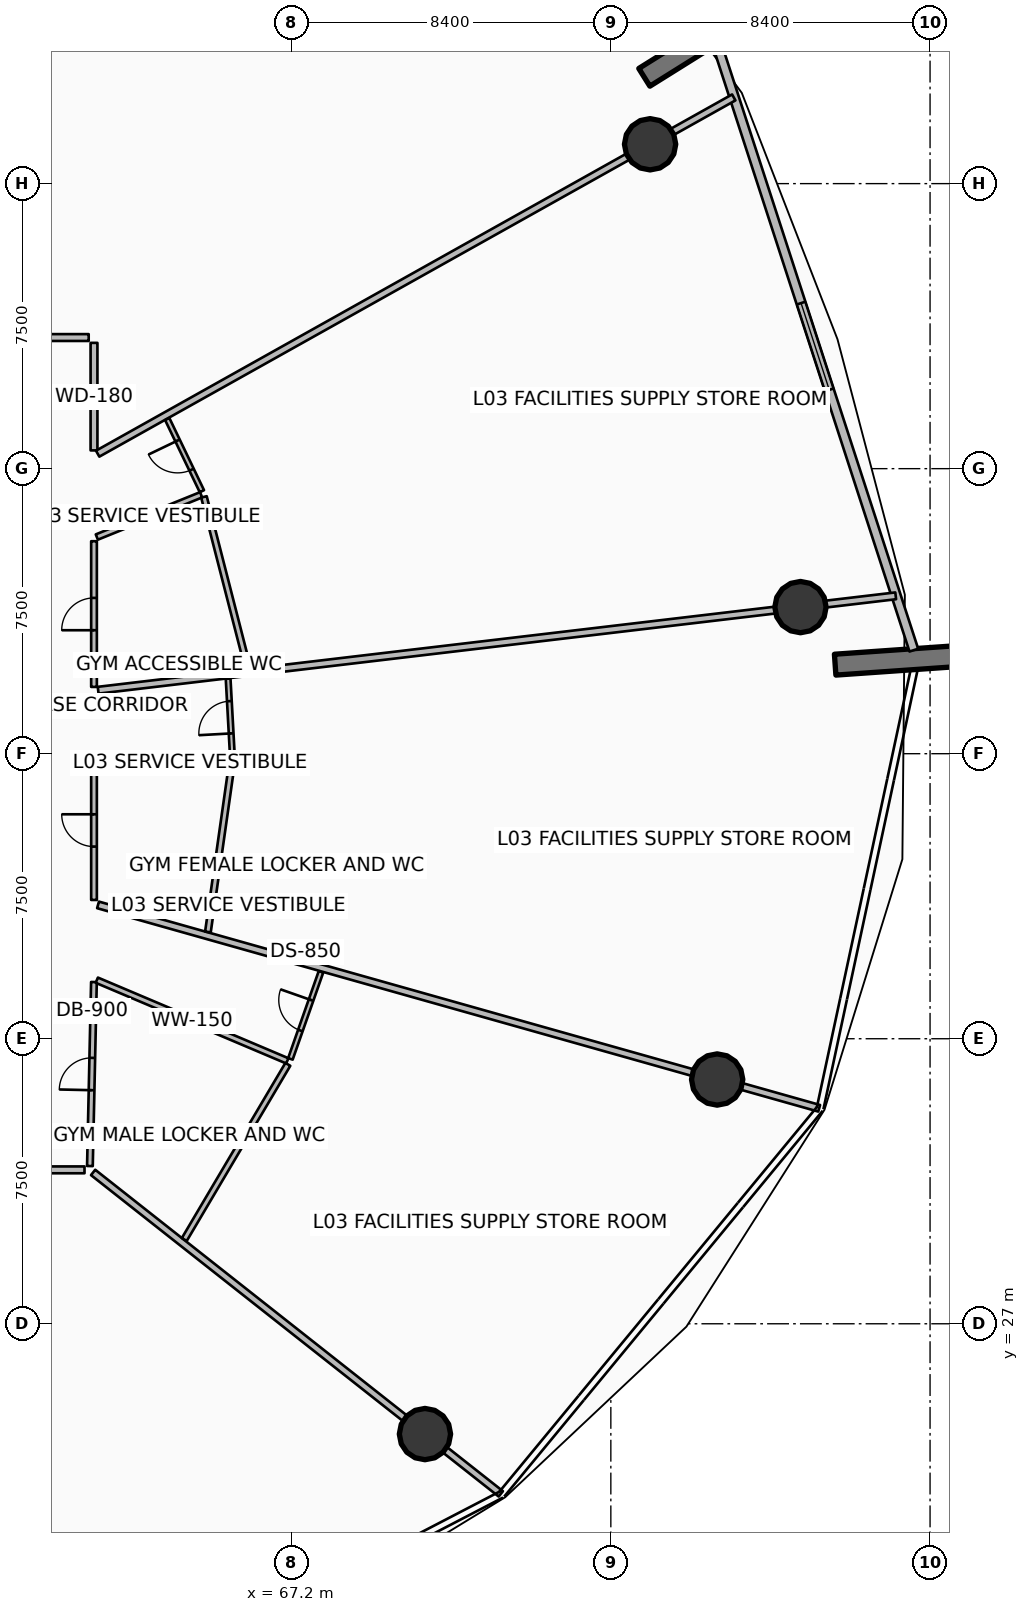
"""IFC4 building model, lengths in metres.
Left out: names, types, materials, properties, quantities, classifications, styles, units other than length and angle.
Written with IfcOpenShell. Run it as: python <this file> out.ifc"""

import sys

from ifc_helpers import new_model, si_unit, direction, frame, frame_2d, origin, origin_2d, place, context, subcontext, project, spatial, rectangle, circle, extrude, element, fill, save


model = new_model("IFC4")
c1 = context("Model", 3, precision=1e-05, world=origin(), true_north=direction((0.0, 1.0)))
c2 = subcontext(c1, "Body", "Model", "MODEL_VIEW")
j1 = project(units=[si_unit("LENGTHUNIT", "METRE"), si_unit("PLANEANGLEUNIT", "RADIAN")], contexts=[c1])
p1 = place(None, origin())
s1 = spatial("IfcSite", under=j1, at=p1, CompositionType="ELEMENT")
p2 = place(p1, origin())
s2 = spatial("IfcBuilding", under=s1, at=p2, CompositionType="ELEMENT")
p3 = place(p2, frame((0.0, 0.0, 16.8)))
s3 = spatial("IfcBuildingStorey", under=s2, at=p3, CompositionType="ELEMENT", Elevation=16.8)
for number, where, z_axis, x_axis in (
    (1, (76.481, 59.797, 0.0), (0.0, 0.0, 1.0), (0.848, 0.53, 0.0)),
    (2, (81.503, 44.343, 0.0), (0.0, 0.0, 1.0), (0.998, 0.07, 0.0)),
):
    element("IfcWall", number, at=place(p3, frame(where, z_axis=z_axis, x_axis=x_axis)), inside=s3, PredefinedType="SOLIDWALL", context=c2, shape_type="SweptSolid", body=[
        extrude(rectangle(XDim=3.5, YDim=0.55, at=frame_2d((1.75, 0.0))), origin(), (0.0, 0.0, 1.0), 4.8),
    ])
for number, where, z_axis, x_axis in (
    (3, (76.633, 58.035, 0.0), (0.0, 0.0, 1.0), (1.0, 0.0, 0.0)),
    (4, (70.709, 24.098, 0.0), (0.0, 0.0, 1.0), (1.0, 0.0, 0.0)),
    (5, (78.398, 33.427, 0.0), (0.0, 0.0, 1.0), (1.0, 0.0, 0.0)),
    (6, (80.59, 45.857, 0.0), (0.0, 0.0, 1.0), (1.0, 0.0, 0.0)),
):
    element("IfcColumn", number, at=place(p3, frame(where, z_axis=z_axis, x_axis=x_axis)), inside=s3, PredefinedType="COLUMN", context=c2, shape_type="SweptSolid", body=[
        extrude(circle(Radius=0.675, at=origin_2d()), origin(), (0.0, 0.0, 1.0), 4.4),
    ])
p4 = place(p3, frame((83.573, 44.725, 0.0), z_axis=(0.0, 0.0, 1.0), x_axis=(-0.309022005354, 0.951054888115, 0.0)))
e7 = element("IfcWall", 7, at=p4, inside=s3, PredefinedType="SOLIDWALL", context=c2, shape_type="SweptSolid", body=[
    extrude(rectangle(XDim=16.803, YDim=0.24, at=frame_2d((8.401, 0.0))), origin(), (0.0, 0.0, 1.0), 3.35),
])
p5 = place(p4, frame((7.201, 0.0, 0.85)))
e8 = element("IfcOpeningElement", 8, at=p5, cuts=e7, PredefinedType="OPENING", context=c2, shape_type="SweptSolid", body=[
    extrude(rectangle(XDim=2.4, YDim=2.1, at=frame_2d((1.2, 1.05))), frame((0.0, 0.13, 0.0), z_axis=(0.0, -1.0, 0.0), x_axis=(1.0, 0.0, 0.0)), (0.0, 0.0, 1.0), 0.26),
])
p6 = place(p3, frame((62.0, 49.98, 0.0), z_axis=(0.0, 0.0, 1.0), x_axis=(0.0, 1.0, 0.0)))
e9 = element("IfcWall", 9, at=p6, inside=s3, PredefinedType="PARTITIONING", context=c2, shape_type="SweptSolid", body=[
    extrude(rectangle(XDim=2.83, YDim=0.18, at=frame_2d((1.415, 0.0))), origin(), (0.0, 0.0, 1.0), 3.613),
])
p7 = place(p3, frame((61.86, 52.95, 0.0), z_axis=(0.0, 0.0, 1.0), x_axis=(-1.0, 0.0, 0.0)))
e10 = element("IfcWall", 10, at=p7, inside=s3, PredefinedType="PARTITIONING", context=c2, shape_type="SweptSolid", body=[
    extrude(rectangle(XDim=5.088, YDim=0.18, at=frame_2d((2.544, 0.0))), origin(), (0.0, 0.0, 1.0), 3.613),
])
p8 = place(p3, frame((62.096, 49.894, 0.0), z_axis=(0.0, 0.0, 1.0), x_axis=(0.872490608205, 0.488630881744, 0.0)))
e11 = element("IfcWall", 11, at=p8, inside=s3, PredefinedType="PARTITIONING", context=c2, shape_type="SweptSolid", body=[
    extrude(rectangle(XDim=19.185, YDim=0.18, at=frame_2d((9.592, 0.0))), origin(), (0.0, 0.0, 1.0), 3.613),
])
p9 = place(p3, frame((54.272, 31.05, 0.0), z_axis=(0.0, 0.0, 1.0), x_axis=(1.0, 0.0, 0.0)))
e12 = element("IfcWall", 12, at=p9, inside=s3, PredefinedType="PARTITIONING", context=c2, shape_type="SweptSolid", body=[
    extrude(rectangle(XDim=7.478, YDim=0.18, at=frame_2d((3.739, 0.0))), origin(), (0.0, 0.0, 1.0), 3.613),
])
p10 = place(p9, frame((3.214, 0.0, 0.0)))
e13 = element("IfcOpeningElement", 13, at=p10, cuts=e12, PredefinedType="OPENING", context=c2, shape_type="SweptSolid", body=[
    extrude(rectangle(XDim=1.05, YDim=2.1, at=frame_2d((0.525, 1.05))), frame((0.0, 0.1, 0.0), z_axis=(0.0, -1.0, 0.0), x_axis=(1.0, 0.0, 0.0)), (0.0, 0.0, 1.0), 0.2),
])
p11 = place(p3, frame((61.976, 30.982, 0.0), z_axis=(0.0, 0.0, 1.0), x_axis=(0.785315783489, -0.619095404766, 0.0)))
e14 = element("IfcWall", 14, at=p11, inside=s3, PredefinedType="PARTITIONING", context=c2, shape_type="SweptSolid", body=[
    extrude(rectangle(XDim=13.661, YDim=0.18, at=frame_2d((6.831, 0.0))), origin(), (0.0, 0.0, 1.0), 3.613),
])
p12 = place(p3, frame((61.892, 31.15, 0.0), z_axis=(0.0, 0.0, 1.0), x_axis=(0.021928973177, 0.999759531155, 0.0)))
e15 = element("IfcWall", 15, at=p12, inside=s3, PredefinedType="PARTITIONING", context=c2, shape_type="SweptSolid", body=[
    extrude(rectangle(XDim=4.843, YDim=0.15, at=frame_2d((2.421, 0.0))), origin(), (0.0, 0.0, 1.0), 3.613),
])
p13 = place(p12, frame((1.997, 0.0, 0.0)))
e16 = element("IfcOpeningElement", 16, at=p13, cuts=e15, PredefinedType="OPENING", context=c2, shape_type="SweptSolid", body=[
    extrude(rectangle(XDim=0.85, YDim=2.06, at=frame_2d((0.425, 1.03))), frame((0.0, 0.085, 0.0), z_axis=(0.0, -1.0, 0.0), x_axis=(1.0, 0.0, 0.0)), (0.0, 0.0, 1.0), 0.17),
])
p14 = place(p3, frame((62.074, 36.041, 0.0), z_axis=(0.0, 0.0, 1.0), x_axis=(0.920841540816, -0.38993699069, 0.0)))
e17 = element("IfcWall", 17, at=p14, inside=s3, PredefinedType="PARTITIONING", context=c2, shape_type="SweptSolid", body=[
    extrude(rectangle(XDim=5.443, YDim=0.15, at=frame_2d((2.722, 0.0))), origin(), (0.0, 0.0, 1.0), 3.84),
])
p15 = place(p3, frame((64.375, 29.217, 0.0), z_axis=(0.0, 0.0, 1.0), x_axis=(0.509047270842, 0.860738564286, 0.0)))
e18 = element("IfcWall", 18, at=p15, inside=s3, PredefinedType="PARTITIONING", context=c2, shape_type="SweptSolid", body=[
    extrude(rectangle(XDim=5.354, YDim=0.15, at=frame_2d((2.677, 0.0))), origin(), (0.0, 0.0, 1.0), 3.613),
])
p16 = place(p3, frame((67.168, 33.97, 0.0), z_axis=(0.0, 0.0, 1.0), x_axis=(0.331316814656, 0.943519564358, 0.0)))
e19 = element("IfcWall", 19, at=p16, inside=s3, PredefinedType="PARTITIONING", context=c2, shape_type="SweptSolid", body=[
    extrude(rectangle(XDim=2.43, YDim=0.125, at=frame_2d((1.215, 0.0))), origin(), (0.0, 0.0, 1.0), 3.613),
])
p17 = place(p16, frame((0.79, 0.0, 0.0)))
e20 = element("IfcOpeningElement", 20, at=p17, cuts=e19, PredefinedType="OPENING", context=c2, shape_type="SweptSolid", body=[
    extrude(rectangle(XDim=0.85, YDim=2.06, at=frame_2d((0.425, 1.03))), frame((0.0, 0.073, 0.0), z_axis=(0.0, -1.0, 0.0), x_axis=(1.0, 0.0, 0.0)), (0.0, 0.0, 1.0), 0.145),
])
p18 = place(p3, frame((62.106, 38.022, 0.0), z_axis=(0.0, 0.0, 1.0), x_axis=(0.962455233657, -0.271440459782, 0.0)))
e21 = element("IfcWall", 21, at=p18, inside=s3, PredefinedType="PARTITIONING", context=c2, shape_type="SweptSolid", body=[
    extrude(rectangle(XDim=19.716, YDim=0.18, at=frame_2d((9.858, 0.0))), origin(), (0.0, 0.0, 1.0), 3.613),
])
p19 = place(p3, frame((62.0, 38.152, 0.0), z_axis=(0.0, 0.0, 1.0), x_axis=(0.0, 1.0, 0.0)))
e22 = element("IfcWall", 22, at=p19, inside=s3, PredefinedType="PARTITIONING", context=c2, shape_type="SweptSolid", body=[
    extrude(rectangle(XDim=3.658, YDim=0.15, at=frame_2d((1.829, 0.0))), origin(), (0.0, 0.0, 1.0), 3.613),
])
p20 = place(p19, frame((1.404, 0.0, 0.0)))
e23 = element("IfcOpeningElement", 23, at=p20, cuts=e22, PredefinedType="OPENING", context=c2, shape_type="SweptSolid", body=[
    extrude(rectangle(XDim=0.85, YDim=2.06, at=frame_2d((0.425, 1.03))), frame((0.0, 0.085, 0.0), z_axis=(0.0, -1.0, 0.0), x_axis=(1.0, 0.0, 0.0)), (0.0, 0.0, 1.0), 0.17),
])
p21 = place(p3, frame((62.08, 41.889, 0.0), z_axis=(0.0, 0.0, 1.0), x_axis=(0.999969031596, -0.007869933178, 0.0)))
e24 = element("IfcWall", 24, at=p21, inside=s3, PredefinedType="PARTITIONING", context=c2, shape_type="SweptSolid", body=[
    extrude(rectangle(XDim=3.505, YDim=0.15, at=frame_2d((1.753, 0.0))), origin(), (0.0, 0.0, 1.0), 3.84),
])
p22 = place(p3, frame((64.998, 37.309, 0.0), z_axis=(0.0, 0.0, 1.0), x_axis=(0.140922059176, 0.990020693338, 0.0)))
e25 = element("IfcWall", 25, at=p22, inside=s3, PredefinedType="PARTITIONING", context=c2, shape_type="SweptSolid", body=[
    extrude(rectangle(XDim=4.518, YDim=0.15, at=frame_2d((2.259, 0.0))), origin(), (0.0, 0.0, 1.0), 3.613),
])
p23 = place(p3, frame((65.641, 41.941, 0.0), z_axis=(0.0, 0.0, 1.0), x_axis=(-0.054918793983, 0.998490824228, 0.0)))
e26 = element("IfcWall", 26, at=p23, inside=s3, PredefinedType="PARTITIONING", context=c2, shape_type="SweptSolid", body=[
    extrude(rectangle(XDim=2.036, YDim=0.125, at=frame_2d((1.018, 0.0))), origin(), (0.0, 0.0, 1.0), 3.613),
])
p24 = place(p23, frame((0.593, 0.0, 0.0)))
e27 = element("IfcOpeningElement", 27, at=p24, cuts=e26, PredefinedType="OPENING", context=c2, shape_type="SweptSolid", body=[
    extrude(rectangle(XDim=0.85, YDim=2.06, at=frame_2d((0.425, 1.03))), frame((0.0, 0.073, 0.0), z_axis=(0.0, -1.0, 0.0), x_axis=(1.0, 0.0, 0.0)), (0.0, 0.0, 1.0), 0.145),
])
p25 = place(p3, frame((62.109, 43.67, 0.0), z_axis=(0.0, 0.0, 1.0), x_axis=(0.993068665713, 0.117535633659, 0.0)))
e28 = element("IfcWall", 28, at=p25, inside=s3, PredefinedType="PARTITIONING", context=c2, shape_type="SweptSolid", body=[
    extrude(rectangle(XDim=21.133, YDim=0.18, at=frame_2d((10.566, 0.0))), origin(), (0.0, 0.0, 1.0), 3.613),
])
p26 = place(p3, frame((62.0, 43.757, 0.0), z_axis=(0.0, 0.0, 1.0), x_axis=(0.0, 1.0, 0.0)))
e29 = element("IfcWall", 29, at=p26, inside=s3, PredefinedType="PARTITIONING", context=c2, shape_type="SweptSolid", body=[
    extrude(rectangle(XDim=3.833, YDim=0.15, at=frame_2d((1.917, 0.0))), origin(), (0.0, 0.0, 1.0), 3.613),
])
p27 = place(p26, frame((1.492, 0.0, 0.0)))
e30 = element("IfcOpeningElement", 30, at=p27, cuts=e29, PredefinedType="OPENING", context=c2, shape_type="SweptSolid", body=[
    extrude(rectangle(XDim=0.85, YDim=2.06, at=frame_2d((0.425, 1.03))), frame((0.0, 0.085, 0.0), z_axis=(0.0, -1.0, 0.0), x_axis=(1.0, 0.0, 0.0)), (0.0, 0.0, 1.0), 0.17),
])
p28 = place(p3, frame((62.074, 47.701, 0.0), z_axis=(0.0, 0.0, 1.0), x_axis=(0.926852538468, 0.375425587747, 0.0)))
e31 = element("IfcWall", 31, at=p28, inside=s3, PredefinedType="PARTITIONING", context=c2, shape_type="SweptSolid", body=[
    extrude(rectangle(XDim=2.96, YDim=0.15, at=frame_2d((1.48, 0.0))), origin(), (0.0, 0.0, 1.0), 3.84),
])
p29 = place(p3, frame((66.054, 44.237, 0.0), z_axis=(0.0, 0.0, 1.0), x_axis=(-0.248710144761, 0.968577959636, 0.0)))
e32 = element("IfcWall", 32, at=p29, inside=s3, PredefinedType="PARTITIONING", context=c2, shape_type="SweptSolid", body=[
    extrude(rectangle(XDim=4.667, YDim=0.15, at=frame_2d((2.333, 0.0))), origin(), (0.0, 0.0, 1.0), 3.613),
])
p30 = place(p3, frame((64.839, 48.906, 0.0), z_axis=(0.0, 0.0, 1.0), x_axis=(-0.432923235959, 0.901430791446, 0.0)))
e33 = element("IfcWall", 33, at=p30, inside=s3, PredefinedType="PARTITIONING", context=c2, shape_type="SweptSolid", body=[
    extrude(rectangle(XDim=2.106, YDim=0.125, at=frame_2d((1.053, 0.0))), origin(), (0.0, 0.0, 1.0), 3.613),
])
p31 = place(p30, frame((0.628, 0.0, 0.0)))
e34 = element("IfcOpeningElement", 34, at=p31, cuts=e33, PredefinedType="OPENING", context=c2, shape_type="SweptSolid", body=[
    extrude(rectangle(XDim=0.85, YDim=2.06, at=frame_2d((0.425, 1.03))), frame((0.0, 0.073, 0.0), z_axis=(0.0, -1.0, 0.0), x_axis=(1.0, 0.0, 0.0)), (0.0, 0.0, 1.0), 0.145),
])
p32 = place(p5, origin())
e35 = element("IfcWindow", 35, at=p32, inside=s3, PartitioningType="SINGLE_PANEL", PredefinedType="WINDOW", context=c2, shape_type="SweptSolid", body=[
    extrude(rectangle(XDim=2.4, YDim=2.1, at=frame_2d((1.2, 1.05))), frame((0.0, 0.03, 0.0), z_axis=(0.0, -1.0, 0.0), x_axis=(1.0, 0.0, 0.0)), (0.0, 0.0, 1.0), 0.06),
])
fill(e8, e35)
p33 = place(p13, origin())
e36 = element("IfcDoor", 36, at=p33, inside=s3, OperationType="SINGLE_SWING_LEFT", PredefinedType="DOOR", context=c2, shape_type="SweptSolid", body=[
    extrude(rectangle(XDim=0.85, YDim=2.06, at=frame_2d((0.425, 1.03))), frame((0.0, 0.025, 0.0), z_axis=(0.0, -1.0, 0.0), x_axis=(1.0, 0.0, 0.0)), (0.0, 0.0, 1.0), 0.05),
])
fill(e16, e36)
p34 = place(p17, origin())
e37 = element("IfcDoor", 37, at=p34, inside=s3, OperationType="SINGLE_SWING_RIGHT", PredefinedType="DOOR", context=c2, shape_type="SweptSolid", body=[
    extrude(rectangle(XDim=0.85, YDim=2.06, at=frame_2d((0.425, 1.03))), frame((0.0, 0.025, 0.0), z_axis=(0.0, -1.0, 0.0), x_axis=(1.0, 0.0, 0.0)), (0.0, 0.0, 1.0), 0.05),
])
fill(e20, e37)
p35 = place(p20, origin())
e38 = element("IfcDoor", 38, at=p35, inside=s3, OperationType="SINGLE_SWING_RIGHT", PredefinedType="DOOR", context=c2, shape_type="SweptSolid", body=[
    extrude(rectangle(XDim=0.85, YDim=2.06, at=frame_2d((0.425, 1.03))), frame((0.0, 0.025, 0.0), z_axis=(0.0, -1.0, 0.0), x_axis=(1.0, 0.0, 0.0)), (0.0, 0.0, 1.0), 0.05),
])
fill(e23, e38)
p36 = place(p24, origin())
e39 = element("IfcDoor", 39, at=p36, inside=s3, OperationType="SINGLE_SWING_LEFT", PredefinedType="DOOR", context=c2, shape_type="SweptSolid", body=[
    extrude(rectangle(XDim=0.85, YDim=2.06, at=frame_2d((0.425, 1.03))), frame((0.0, 0.025, 0.0), z_axis=(0.0, -1.0, 0.0), x_axis=(1.0, 0.0, 0.0)), (0.0, 0.0, 1.0), 0.05),
])
fill(e27, e39)
p37 = place(p27, origin())
e40 = element("IfcDoor", 40, at=p37, inside=s3, OperationType="SINGLE_SWING_LEFT", PredefinedType="DOOR", context=c2, shape_type="SweptSolid", body=[
    extrude(rectangle(XDim=0.85, YDim=2.06, at=frame_2d((0.425, 1.03))), frame((0.0, 0.025, 0.0), z_axis=(0.0, -1.0, 0.0), x_axis=(1.0, 0.0, 0.0)), (0.0, 0.0, 1.0), 0.05),
])
fill(e30, e40)
p38 = place(p31, origin())
e41 = element("IfcDoor", 41, at=p38, inside=s3, OperationType="SINGLE_SWING_RIGHT", PredefinedType="DOOR", context=c2, shape_type="SweptSolid", body=[
    extrude(rectangle(XDim=0.85, YDim=2.06, at=frame_2d((0.425, 1.03))), frame((0.0, 0.025, 0.0), z_axis=(0.0, -1.0, 0.0), x_axis=(1.0, 0.0, 0.0)), (0.0, 0.0, 1.0), 0.05),
])
fill(e34, e41)
save(model, sys.argv[1])
